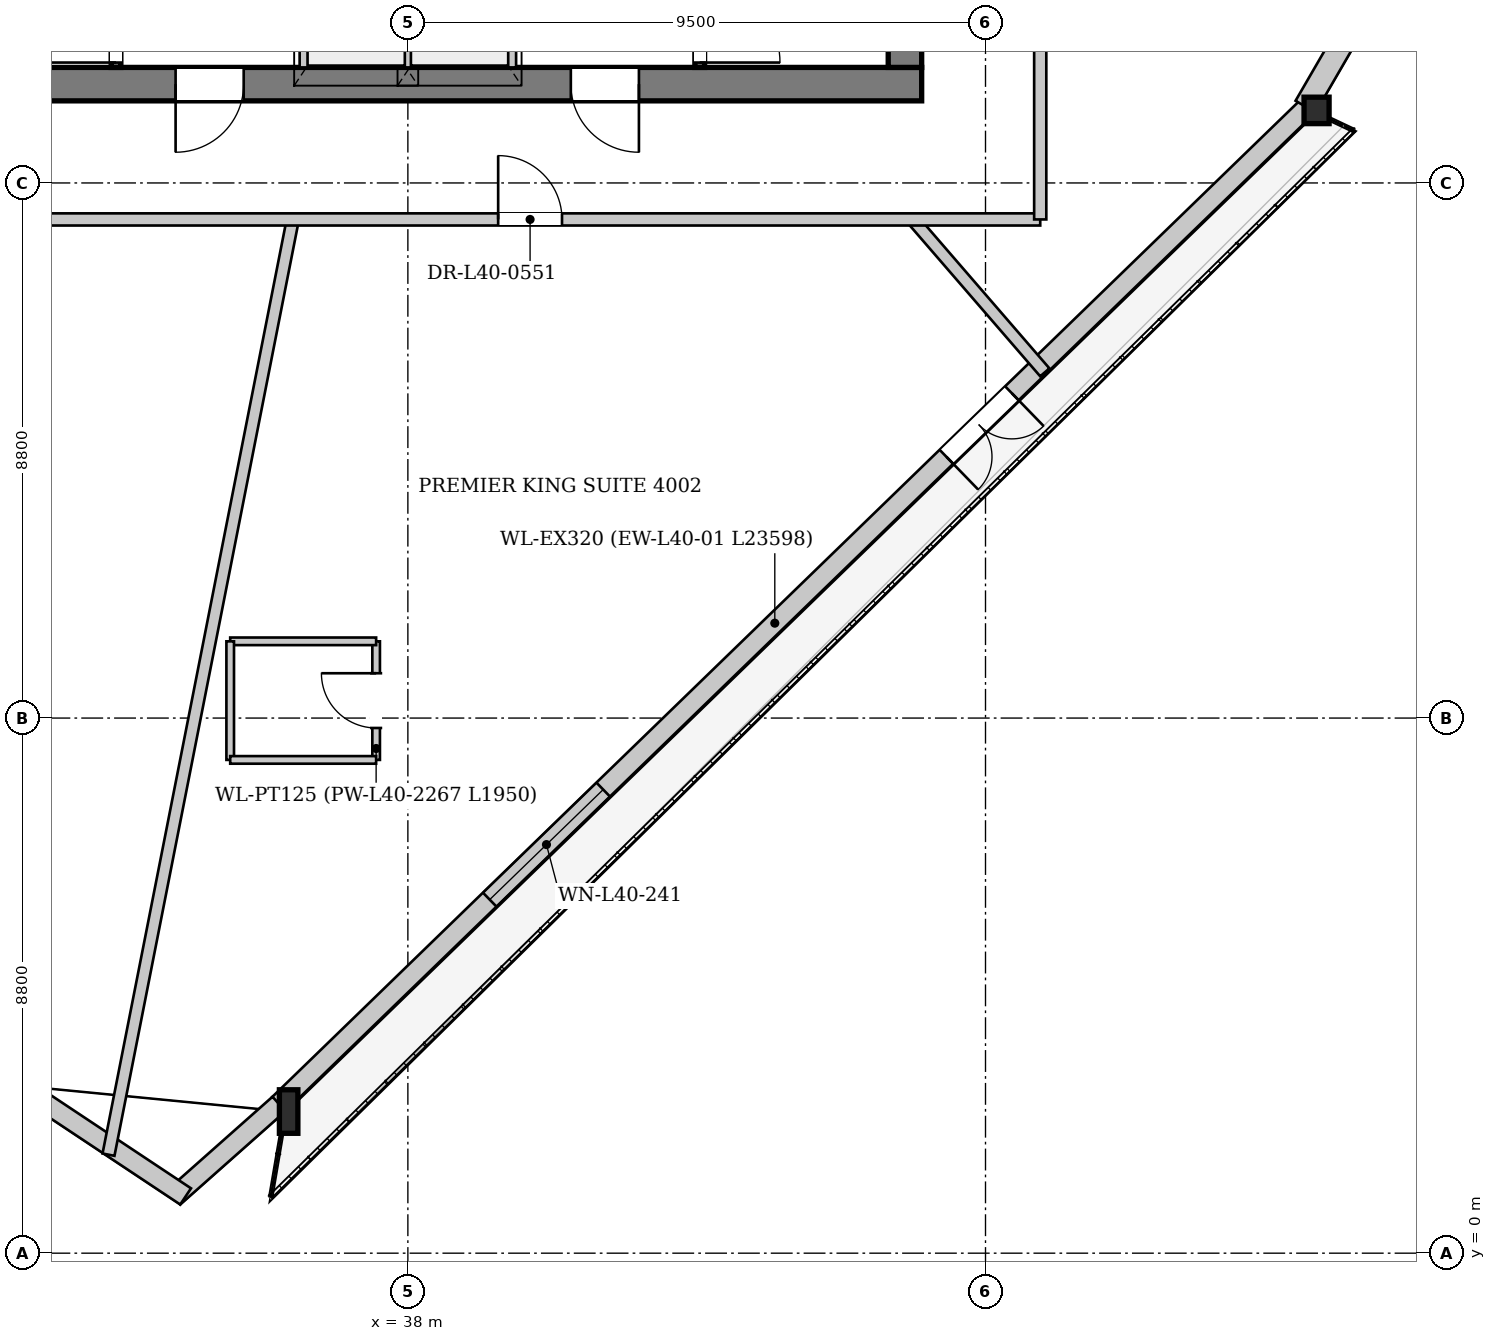
"""IFC4 building model, lengths in metres.
Left out: names, types, materials, properties, quantities, classifications, styles, units other than length and angle.
Written with IfcOpenShell. Run it as: python <this file> out.ifc"""

import sys

from ifc_helpers import new_model, si_unit, direction, frame, frame_2d, origin, origin_2d, place, context, subcontext, project, spatial, rectangle, i_section, extrude, source, transform, mapped, element, fill, save


model = new_model("IFC4")
c1 = context("Model", 3, precision=1e-05, world=origin(), true_north=direction((0.0, 1.0)))
c2 = subcontext(c1, "Body", "Model", "MODEL_VIEW")
j1 = project(units=[si_unit("LENGTHUNIT", "METRE"), si_unit("PLANEANGLEUNIT", "RADIAN")], contexts=[c1])
p1 = place(None, origin())
s1 = spatial("IfcSite", under=j1, at=p1, CompositionType="ELEMENT")
p2 = place(p1, origin())
s2 = spatial("IfcBuilding", under=s1, at=p2, CompositionType="ELEMENT")
p3 = place(p2, frame((0.0, 0.0, 153.7)))
s3 = spatial("IfcBuildingStorey", under=s2, at=p3, CompositionType="ELEMENT", Elevation=153.7)
m1 = source(origin(), c2, "Body", "SweptSolid", [
    extrude(i_section(OverallWidth=0.304, OverallDepth=0.716, WebThickness=0.021, FlangeThickness=0.04, at=origin_2d()), origin(), (0.0, 0.0, 1.0), 3.387),
])
p4 = place(p3, frame((35.986, 2.333, 0.0), z_axis=(0.031286415986, -0.002523098063, 0.999507275687), x_axis=(0.08038418992, 0.996763955012, 0.0)))
e1 = element("IfcColumn", 1, at=p4, inside=s3, PredefinedType="COLUMN", context=c2, shape_type="MappedRepresentation", body=[
    mapped(m1, transform((0.0, 0.0, 0.0), x_axis=(1.0, 0.0, 0.0), y_axis=(0.0, 1.0, 0.0), z_axis=(0.0, 0.0, 1.0), scale=1.0)),
])
m2 = source(origin(), c2, "Body", "SweptSolid", [
    extrude(i_section(OverallWidth=0.412, OverallDepth=0.435, WebThickness=0.031, FlangeThickness=0.05, at=origin_2d()), origin(), (0.0, 0.0, 1.0), 3.386),
])
p5 = place(p3, frame((52.928, 18.76, 0.0), z_axis=(0.010094981333, 0.019252571542, 0.999763686999), x_axis=(-0.885636687286, 0.464378787341, 0.0)))
e2 = element("IfcColumn", 2, at=p5, inside=s3, PredefinedType="COLUMN", context=c2, shape_type="MappedRepresentation", body=[
    mapped(m2, transform((0.0, 0.0, 0.0), x_axis=(1.0, 0.0, 0.0), y_axis=(0.0, 1.0, 0.0), z_axis=(0.0, 0.0, 1.0), scale=1.0)),
])
p6 = place(p3, frame((52.816, 18.875, 0.0), z_axis=(0.0, 0.0, 1.0), x_axis=(-0.717927185301, -0.696118205914, 0.0)))
e3 = element("IfcWall", 3, at=p6, inside=s3, PredefinedType="SOLIDWALL", context=c2, shape_type="SweptSolid", body=[
    extrude(rectangle(XDim=23.598, YDim=0.32, at=frame_2d((11.799, 0.0))), origin(), (0.0, 0.0, 1.0), 2.692),
])
p7 = place(p6, frame((6.801, 0.0, 0.0)))
e4 = element("IfcOpeningElement", 4, at=p7, cuts=e3, PredefinedType="OPENING", context=c2, shape_type="SweptSolid", body=[
    extrude(rectangle(XDim=1.5, YDim=2.3, at=frame_2d((0.75, 1.15))), frame((0.0, 0.17, 0.0), z_axis=(0.0, -1.0, 0.0), x_axis=(1.0, 0.0, 0.0)), (0.0, 0.0, 1.0), 0.34),
])
p8 = place(p6, frame((16.163, 0.0, 0.25)))
e5 = element("IfcOpeningElement", 5, at=p8, cuts=e3, PredefinedType="OPENING", context=c2, shape_type="SweptSolid", body=[
    extrude(rectangle(XDim=2.6, YDim=2.35, at=frame_2d((1.3, 1.175))), frame((0.0, 0.17, 0.0), z_axis=(0.0, -1.0, 0.0), x_axis=(1.0, 0.0, 0.0)), (0.0, 0.0, 1.0), 0.34),
])
p9 = place(p3, frame((35.88, 2.453, 0.0), z_axis=(0.0, 0.0, 1.0), x_axis=(-0.748288552772, -0.663373380375, 0.0)))
e6 = element("IfcWall", 6, at=p9, inside=s3, PredefinedType="SOLIDWALL", context=c2, shape_type="SweptSolid", body=[
    extrude(rectangle(XDim=2.312, YDim=0.32, at=frame_2d((1.156, 0.0))), origin(), (0.0, 0.0, 1.0), 2.692),
])
p10 = place(p3, frame((34.345, 0.933, 0.0), z_axis=(0.0, 0.0, 1.0), x_axis=(-0.832894192316, 0.553432258191, 0.0)))
e7 = element("IfcWall", 7, at=p10, inside=s3, PredefinedType="SOLIDWALL", context=c2, shape_type="SweptSolid", body=[
    extrude(rectangle(XDim=3.601, YDim=0.32, at=frame_2d((1.801, 0.0))), origin(), (0.0, 0.0, 1.0), 2.692),
])
p11 = place(p3, frame((64.604, 39.268, 0.0), z_axis=(0.0, 0.0, 1.0), x_axis=(-0.501770576444, -0.865000744864, 0.0)))
e8 = element("IfcWall", 8, at=p11, inside=s3, PredefinedType="SOLIDWALL", context=c2, shape_type="SweptSolid", body=[
    extrude(rectangle(XDim=23.598, YDim=0.38, at=frame_2d((11.799, 0.0))), origin(), (0.0, 0.0, 1.0), 2.692),
])
p12 = place(p11, frame((5.507, 0.0, 0.322)))
e9 = element("IfcOpeningElement", 9, at=p12, cuts=e8, PredefinedType="OPENING", context=c2, shape_type="SweptSolid", body=[
    extrude(rectangle(XDim=2.2, YDim=2.25, at=frame_2d((1.1, 1.125))), frame((0.0, 0.2, 0.0), z_axis=(0.0, -1.0, 0.0), x_axis=(1.0, 0.0, 0.0)), (0.0, 0.0, 1.0), 0.4),
])
p13 = place(p11, frame((15.891, 0.0, 0.322)))
e10 = element("IfcOpeningElement", 10, at=p13, cuts=e8, PredefinedType="OPENING", context=c2, shape_type="SweptSolid", body=[
    extrude(rectangle(XDim=2.2, YDim=2.25, at=frame_2d((1.1, 1.125))), frame((0.0, 0.2, 0.0), z_axis=(0.0, -1.0, 0.0), x_axis=(1.0, 0.0, 0.0)), (0.0, 0.0, 1.0), 0.4),
])
p14 = place(p3, frame((46.45, 19.225, 0.0), z_axis=(0.0, 0.0, 1.0), x_axis=(-1.0, 0.0, 0.0)))
e11 = element("IfcWall", 11, at=p14, inside=s3, PredefinedType="SHEAR", context=c2, shape_type="SweptSolid", body=[
    extrude(rectangle(XDim=16.9, YDim=0.55, at=frame_2d((8.45, 0.0))), origin(), (0.0, 0.0, 1.0), 3.3),
])
p15 = place(p14, frame((4.65, 0.0, 0.0)))
e12 = element("IfcOpeningElement", 12, at=p15, cuts=e11, PredefinedType="OPENING", context=c2, shape_type="SweptSolid", body=[
    extrude(rectangle(XDim=1.12, YDim=2.25, at=frame_2d((0.56, 1.125))), frame((0.0, 0.285, 0.0), z_axis=(0.0, -1.0, 0.0), x_axis=(1.0, 0.0, 0.0)), (0.0, 0.0, 1.0), 0.57),
])
p16 = place(p14, frame((11.15, 0.0, 0.0)))
e13 = element("IfcOpeningElement", 13, at=p16, cuts=e11, PredefinedType="OPENING", context=c2, shape_type="SweptSolid", body=[
    extrude(rectangle(XDim=1.12, YDim=2.25, at=frame_2d((0.56, 1.125))), frame((0.0, 0.285, 0.0), z_axis=(0.0, -1.0, 0.0), x_axis=(1.0, 0.0, 0.0)), (0.0, 0.0, 1.0), 0.57),
])
p17 = place(p3, frame((46.175, 33.7, 0.0), z_axis=(0.0, 0.0, 1.0), x_axis=(0.0, -1.0, 0.0)))
e14 = element("IfcWall", 14, at=p17, inside=s3, PredefinedType="SHEAR", context=c2, shape_type="SweptSolid", body=[
    extrude(rectangle(XDim=14.2, YDim=0.55, at=frame_2d((7.1, 0.0))), origin(), (0.0, 0.0, 1.0), 3.3),
])
p18 = place(p17, frame((5.18, 0.0, 0.0)))
e15 = element("IfcOpeningElement", 15, at=p18, cuts=e14, PredefinedType="OPENING", context=c2, shape_type="SweptSolid", body=[
    extrude(rectangle(XDim=1.6, YDim=2.2, at=frame_2d((0.8, 1.1))), frame((0.0, 0.285, 0.0), z_axis=(0.0, -1.0, 0.0), x_axis=(1.0, 0.0, 0.0)), (0.0, 0.0, 1.0), 0.57),
])
p19 = place(p17, frame((2.05, 0.0, 0.0)))
e16 = element("IfcOpeningElement", 16, at=p19, cuts=e14, PredefinedType="OPENING", context=c2, shape_type="SweptSolid", body=[
    extrude(rectangle(XDim=0.95, YDim=2.1, at=frame_2d((0.475, 1.05))), frame((0.0, 0.285, 0.0), z_axis=(0.0, -1.0, 0.0), x_axis=(1.0, 0.0, 0.0)), (0.0, 0.0, 1.0), 0.57),
])
p20 = place(p3, frame((33.2, 19.5, 0.0), z_axis=(0.0, 0.0, 1.0), x_axis=(0.0, 1.0, 0.0)))
e17 = element("IfcWall", 17, at=p20, inside=s3, PredefinedType="PARTITIONING", context=c2, shape_type="SweptSolid", body=[
    extrude(rectangle(XDim=7.46, YDim=0.16, at=frame_2d((3.73, 0.0))), origin(), (0.0, 0.0, 1.0), 3.3),
])
p21 = place(p20, frame((0.08, 0.0, 0.0)))
e18 = element("IfcOpeningElement", 18, at=p21, cuts=e17, PredefinedType="OPENING", context=c2, shape_type="SweptSolid", body=[
    extrude(rectangle(XDim=1.32, YDim=2.2, at=frame_2d((0.66, 1.1))), frame((0.0, 0.09, 0.0), z_axis=(0.0, -1.0, 0.0), x_axis=(1.0, 0.0, 0.0)), (0.0, 0.0, 1.0), 0.18),
])
p22 = place(p3, frame((42.8, 26.96, 0.0), z_axis=(0.0, 0.0, 1.0), x_axis=(0.0, -1.0, 0.0)))
e19 = element("IfcWall", 19, at=p22, inside=s3, PredefinedType="PARTITIONING", context=c2, shape_type="SweptSolid", body=[
    extrude(rectangle(XDim=7.46, YDim=0.16, at=frame_2d((3.73, 0.0))), origin(), (0.0, 0.0, 1.0), 3.3),
])
p23 = place(p22, frame((6.06, 0.0, 0.0)))
e20 = element("IfcOpeningElement", 20, at=p23, cuts=e19, PredefinedType="OPENING", context=c2, shape_type="SweptSolid", body=[
    extrude(rectangle(XDim=1.32, YDim=2.2, at=frame_2d((0.66, 1.1))), frame((0.0, 0.09, 0.0), z_axis=(0.0, -1.0, 0.0), x_axis=(1.0, 0.0, 0.0)), (0.0, 0.0, 1.0), 0.18),
])
p24 = place(p3, frame((36.3, 19.5, 0.0), z_axis=(0.0, 0.0, 1.0), x_axis=(0.0, 1.0, 0.0)))
e21 = element("IfcWall", 21, at=p24, inside=s3, PredefinedType="PARTITIONING", context=c2, shape_type="SweptSolid", body=[
    extrude(rectangle(XDim=4.78, YDim=0.16, at=frame_2d((2.39, 0.0))), origin(), (0.0, 0.0, 1.0), 3.3),
])
p25 = place(p24, frame((0.6, 0.0, 0.0)))
e22 = element("IfcOpeningElement", 22, at=p25, cuts=e21, PredefinedType="OPENING", context=c2, shape_type="SweptSolid", body=[
    extrude(rectangle(XDim=1.2, YDim=2.2, at=frame_2d((0.6, 1.1))), frame((0.0, 0.09, 0.0), z_axis=(0.0, -1.0, 0.0), x_axis=(1.0, 0.0, 0.0)), (0.0, 0.0, 1.0), 0.18),
])
p26 = place(p24, frame((2.65, 0.0, 0.0)))
e23 = element("IfcOpeningElement", 23, at=p26, cuts=e21, PredefinedType="OPENING", context=c2, shape_type="SweptSolid", body=[
    extrude(rectangle(XDim=0.95, YDim=2.1, at=frame_2d((0.475, 1.05))), frame((0.0, 0.09, 0.0), z_axis=(0.0, -1.0, 0.0), x_axis=(1.0, 0.0, 0.0)), (0.0, 0.0, 1.0), 0.18),
])
p27 = place(p3, frame((39.7, 24.28, 0.0), z_axis=(0.0, 0.0, 1.0), x_axis=(0.0, -1.0, 0.0)))
e24 = element("IfcWall", 24, at=p27, inside=s3, PredefinedType="PARTITIONING", context=c2, shape_type="SweptSolid", body=[
    extrude(rectangle(XDim=4.78, YDim=0.16, at=frame_2d((2.39, 0.0))), origin(), (0.0, 0.0, 1.0), 3.3),
])
p28 = place(p27, frame((3.12, 0.0, 0.0)))
e25 = element("IfcOpeningElement", 25, at=p28, cuts=e24, PredefinedType="OPENING", context=c2, shape_type="SweptSolid", body=[
    extrude(rectangle(XDim=1.2, YDim=2.2, at=frame_2d((0.6, 1.1))), frame((0.0, 0.09, 0.0), z_axis=(0.0, -1.0, 0.0), x_axis=(1.0, 0.0, 0.0)), (0.0, 0.0, 1.0), 0.18),
])
p29 = place(p3, frame((38.0, 19.5, 0.0), z_axis=(0.0, 0.0, 1.0), x_axis=(0.0, 1.0, 0.0)))
e26 = element("IfcWall", 26, at=p29, inside=s3, PredefinedType="PARTITIONING", context=c2, shape_type="SweptSolid", body=[
    extrude(rectangle(XDim=2.46, YDim=0.125, at=frame_2d((1.23, 0.0))), origin(), (0.0, 0.0, 1.0), 3.3),
])
p30 = place(p3, frame((36.108, 17.0, 0.0), z_axis=(0.0, 0.0, 1.0), x_axis=(-0.193383912319, -0.981123163755, 0.0)))
e27 = element("IfcWall", 27, at=p30, inside=s3, PredefinedType="PARTITIONING", context=c2, shape_type="SweptSolid", body=[
    extrude(rectangle(XDim=15.676, YDim=0.2, at=frame_2d((7.838, 0.0))), origin(), (0.0, 0.0, 1.0), 3.3),
])
p31 = place(p3, frame((46.301, 17.0, 0.0), z_axis=(0.0, 0.0, 1.0), x_axis=(0.654105377462, -0.756403434137, 0.0)))
e28 = element("IfcWall", 28, at=p31, inside=s3, PredefinedType="PARTITIONING", context=c2, shape_type="SweptSolid", body=[
    extrude(rectangle(XDim=3.324, YDim=0.2, at=frame_2d((1.662, 0.0))), origin(), (0.0, 0.0, 1.0), 3.3),
])
p32 = place(p3, frame((37.478, 8.112, 0.0), z_axis=(0.0, 0.0, 1.0), x_axis=(0.0, 1.0, 0.0)))
e29 = element("IfcWall", 29, at=p32, inside=s3, PredefinedType="PARTITIONING", context=c2, shape_type="SweptSolid", body=[
    extrude(rectangle(XDim=1.95, YDim=0.125, at=frame_2d((0.975, 0.0))), origin(), (0.0, 0.0, 1.0), 3.3),
])
p33 = place(p32, frame((0.525, 0.0, 0.0)))
e30 = element("IfcOpeningElement", 30, at=p33, cuts=e29, PredefinedType="OPENING", context=c2, shape_type="SweptSolid", body=[
    extrude(rectangle(XDim=0.9, YDim=2.1, at=frame_2d((0.45, 1.05))), frame((0.0, 0.073, 0.0), z_axis=(0.0, -1.0, 0.0), x_axis=(1.0, 0.0, 0.0)), (0.0, 0.0, 1.0), 0.145),
])
p34 = place(p3, frame((37.478, 10.062, 0.0), z_axis=(0.0, 0.0, 1.0), x_axis=(-1.0, 0.0, 0.0)))
e31 = element("IfcWall", 31, at=p34, inside=s3, PredefinedType="PARTITIONING", context=c2, shape_type="SweptSolid", body=[
    extrude(rectangle(XDim=2.4, YDim=0.125, at=frame_2d((1.2, 0.0))), origin(), (0.0, 0.0, 1.0), 3.3),
])
p35 = place(p3, frame((35.078, 10.062, 0.0), z_axis=(0.0, 0.0, 1.0), x_axis=(0.0, -1.0, 0.0)))
e32 = element("IfcWall", 32, at=p35, inside=s3, PredefinedType="PARTITIONING", context=c2, shape_type="SweptSolid", body=[
    extrude(rectangle(XDim=1.95, YDim=0.125, at=frame_2d((0.975, 0.0))), origin(), (0.0, 0.0, 1.0), 2.895),
])
p36 = place(p3, frame((35.078, 8.112, 0.0), z_axis=(0.0, 0.0, 1.0), x_axis=(1.0, 0.0, 0.0)))
e33 = element("IfcWall", 33, at=p36, inside=s3, PredefinedType="PARTITIONING", context=c2, shape_type="SweptSolid", body=[
    extrude(rectangle(XDim=2.4, YDim=0.125, at=frame_2d((1.2, 0.0))), origin(), (0.0, 0.0, 1.0), 3.3),
])
p37 = place(p3, frame((27.6, 17.0, 0.0), z_axis=(0.0, 0.0, 1.0), x_axis=(1.0, 0.0, 0.0)))
e34 = element("IfcWall", 34, at=p37, inside=s3, PredefinedType="PARTITIONING", context=c2, shape_type="SweptSolid", body=[
    extrude(rectangle(XDim=20.8, YDim=0.2, at=frame_2d((10.4, 0.0))), origin(), (0.0, 0.0, 1.0), 3.3),
])
p38 = place(p37, frame((11.885, 0.0, 0.0)))
e35 = element("IfcOpeningElement", 35, at=p38, cuts=e34, PredefinedType="OPENING", context=c2, shape_type="SweptSolid", body=[
    extrude(rectangle(XDim=1.05, YDim=2.2, at=frame_2d((0.525, 1.1))), frame((0.0, 0.11, 0.0), z_axis=(0.0, -1.0, 0.0), x_axis=(1.0, 0.0, 0.0)), (0.0, 0.0, 1.0), 0.22),
])
p39 = place(p3, frame((48.4, 17.0, 0.0), z_axis=(0.0, 0.0, 1.0), x_axis=(0.0, 1.0, 0.0)))
e36 = element("IfcWall", 36, at=p39, inside=s3, PredefinedType="PARTITIONING", context=c2, shape_type="SweptSolid", body=[
    extrude(rectangle(XDim=19.2, YDim=0.2, at=frame_2d((9.6, 0.0))), origin(), (0.0, 0.0, 1.0), 3.3),
])
p40 = place(p39, frame((3.695, 0.0, 0.0)))
e37 = element("IfcOpeningElement", 37, at=p40, cuts=e36, PredefinedType="OPENING", context=c2, shape_type="SweptSolid", body=[
    extrude(rectangle(XDim=1.05, YDim=2.2, at=frame_2d((0.525, 1.1))), frame((0.0, 0.11, 0.0), z_axis=(0.0, -1.0, 0.0), x_axis=(1.0, 0.0, 0.0)), (0.0, 0.0, 1.0), 0.22),
])
p41 = place(p39, frame((14.018, 0.0, 0.0)))
e38 = element("IfcOpeningElement", 38, at=p41, cuts=e36, PredefinedType="OPENING", context=c2, shape_type="SweptSolid", body=[
    extrude(rectangle(XDim=1.05, YDim=2.2, at=frame_2d((0.525, 1.1))), frame((0.0, 0.11, 0.0), z_axis=(0.0, -1.0, 0.0), x_axis=(1.0, 0.0, 0.0)), (0.0, 0.0, 1.0), 0.22),
])
m3 = source(origin(), c2, "Body", "SweptSolid", [
    extrude(rectangle(XDim=1.5, YDim=2.3, at=frame_2d((0.75, 1.15))), frame((0.0, 0.025, 0.0), z_axis=(0.0, -1.0, 0.0), x_axis=(1.0, 0.0, 0.0)), (0.0, 0.0, 1.0), 0.05),
])
p42 = place(p7, origin())
e39 = element("IfcDoor", 39, at=p42, inside=s3, OperationType="DOUBLE_DOOR_SINGLE_SWING", PredefinedType="DOOR", context=c2, shape_type="MappedRepresentation", body=[
    mapped(m3, transform((0.0, 0.0, 0.0), x_axis=(1.0, 0.0, 0.0), y_axis=(0.0, 1.0, 0.0), z_axis=(0.0, 0.0, 1.0), scale=1.0)),
])
fill(e4, e39)
m4 = source(origin(), c2, "Body", "SweptSolid", [
    extrude(rectangle(XDim=2.6, YDim=2.35, at=frame_2d((1.3, 1.175))), frame((0.0, 0.03, 0.0), z_axis=(0.0, -1.0, 0.0), x_axis=(1.0, 0.0, 0.0)), (0.0, 0.0, 1.0), 0.06),
])
p43 = place(p8, origin())
e40 = element("IfcWindow", 40, at=p43, inside=s3, PartitioningType="SINGLE_PANEL", PredefinedType="WINDOW", context=c2, shape_type="MappedRepresentation", body=[
    mapped(m4, transform((0.0, 0.0, 0.0), x_axis=(1.0, 0.0, 0.0), y_axis=(0.0, 1.0, 0.0), z_axis=(0.0, 0.0, 1.0), scale=1.0)),
])
fill(e5, e40)
m5 = source(origin(), c2, "Body", "SweptSolid", [
    extrude(rectangle(XDim=1.12, YDim=2.25, at=frame_2d((0.56, 1.125))), frame((0.0, 0.025, 0.0), z_axis=(0.0, -1.0, 0.0), x_axis=(1.0, 0.0, 0.0)), (0.0, 0.0, 1.0), 0.05),
])
p44 = place(p15, origin())
e41 = element("IfcDoor", 41, at=p44, inside=s3, OperationType="SINGLE_SWING_LEFT", PredefinedType="DOOR", context=c2, shape_type="MappedRepresentation", body=[
    mapped(m5, transform((0.0, 0.0, 0.0), x_axis=(1.0, 0.0, 0.0), y_axis=(0.0, 1.0, 0.0), z_axis=(0.0, 0.0, 1.0), scale=1.0)),
])
fill(e12, e41)
p45 = place(p16, origin())
e42 = element("IfcDoor", 42, at=p45, inside=s3, OperationType="SINGLE_SWING_RIGHT", PredefinedType="DOOR", context=c2, shape_type="MappedRepresentation", body=[
    mapped(m5, transform((0.0, 0.0, 0.0), x_axis=(1.0, 0.0, 0.0), y_axis=(0.0, 1.0, 0.0), z_axis=(0.0, 0.0, 1.0), scale=1.0)),
])
fill(e13, e42)
m6 = source(origin(), c2, "Body", "SweptSolid", [
    extrude(rectangle(XDim=1.32, YDim=2.2, at=frame_2d((0.66, 1.1))), frame((0.0, 0.025, 0.0), z_axis=(0.0, -1.0, 0.0), x_axis=(1.0, 0.0, 0.0)), (0.0, 0.0, 1.0), 0.05),
])
p46 = place(p21, origin())
e43 = element("IfcDoor", 43, at=p46, inside=s3, OperationType="SINGLE_SWING_LEFT", PredefinedType="DOOR", context=c2, shape_type="MappedRepresentation", body=[
    mapped(m6, transform((0.0, 0.0, 0.0), x_axis=(1.0, 0.0, 0.0), y_axis=(0.0, 1.0, 0.0), z_axis=(0.0, 0.0, 1.0), scale=1.0)),
])
fill(e18, e43)
p47 = place(p23, origin())
e44 = element("IfcDoor", 44, at=p47, inside=s3, OperationType="SINGLE_SWING_RIGHT", PredefinedType="DOOR", context=c2, shape_type="MappedRepresentation", body=[
    mapped(m6, transform((0.0, 0.0, 0.0), x_axis=(1.0, 0.0, 0.0), y_axis=(0.0, 1.0, 0.0), z_axis=(0.0, 0.0, 1.0), scale=1.0)),
])
fill(e20, e44)
m7 = source(origin(), c2, "Body", "SweptSolid", [
    extrude(rectangle(XDim=0.9, YDim=2.1, at=frame_2d((0.45, 1.05))), frame((0.0, 0.025, 0.0), z_axis=(0.0, -1.0, 0.0), x_axis=(1.0, 0.0, 0.0)), (0.0, 0.0, 1.0), 0.05),
])
p48 = place(p33, origin())
e45 = element("IfcDoor", 45, at=p48, inside=s3, OperationType="SINGLE_SWING_RIGHT", PredefinedType="DOOR", context=c2, shape_type="MappedRepresentation", body=[
    mapped(m7, transform((0.0, 0.0, 0.0), x_axis=(1.0, 0.0, 0.0), y_axis=(0.0, 1.0, 0.0), z_axis=(0.0, 0.0, 1.0), scale=1.0)),
])
fill(e30, e45)
m8 = source(origin(), c2, "Body", "SweptSolid", [
    extrude(rectangle(XDim=1.05, YDim=2.2, at=frame_2d((0.525, 1.1))), frame((0.0, 0.025, 0.0), z_axis=(0.0, -1.0, 0.0), x_axis=(1.0, 0.0, 0.0)), (0.0, 0.0, 1.0), 0.05),
])
p49 = place(p38, origin())
e46 = element("IfcDoor", 46, at=p49, inside=s3, OperationType="SINGLE_SWING_LEFT", PredefinedType="DOOR", context=c2, shape_type="MappedRepresentation", body=[
    mapped(m8, transform((0.0, 0.0, 0.0), x_axis=(1.0, 0.0, 0.0), y_axis=(0.0, 1.0, 0.0), z_axis=(0.0, 0.0, 1.0), scale=1.0)),
])
fill(e35, e46)
save(model, sys.argv[1])
